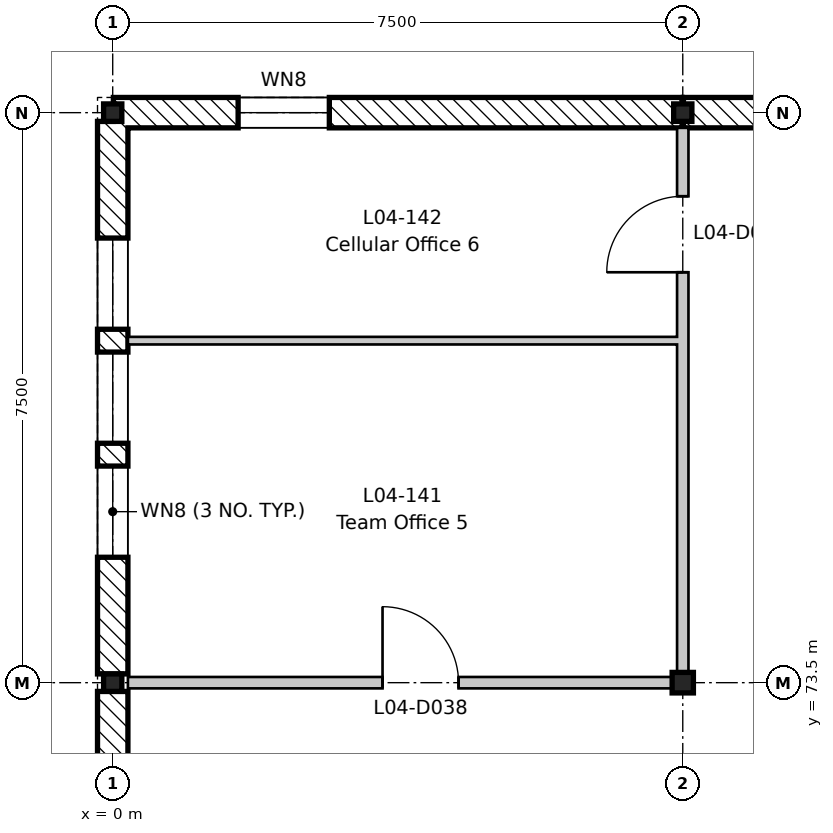
"""IFC4 building model, lengths in metres.
Left out: names, types, materials, properties, quantities, classifications, styles, units other than length and angle.
Written with IfcOpenShell. Run it as: python <this file> out.ifc"""

import sys

from ifc_helpers import new_model, si_unit, direction, frame, frame_2d, origin, origin_2d, place, context, subcontext, project, spatial, rectangle, i_section, extrude, element, fill, save


model = new_model("IFC4")
c1 = context("Model", 3, precision=1e-05, world=origin(), true_north=direction((0.0, 1.0)))
c2 = subcontext(c1, "Body", "Model", "MODEL_VIEW")
j1 = project(units=[si_unit("LENGTHUNIT", "METRE"), si_unit("PLANEANGLEUNIT", "RADIAN")], contexts=[c1])
p1 = place(None, origin())
s1 = spatial("IfcSite", under=j1, at=p1, CompositionType="ELEMENT")
p2 = place(p1, origin())
s2 = spatial("IfcBuilding", under=s1, at=p2, CompositionType="ELEMENT")
p3 = place(p2, frame((0.0, 0.0, 18.6)))
s3 = spatial("IfcBuildingStorey", under=s2, at=p3, CompositionType="ELEMENT", Elevation=18.6)
for number, where, z_axis, x_axis in (
    (1, (0.0, 73.5, -0.2), (0.0, 0.0, 1.0), (1.0, 0.0, 0.0)),
    (2, (0.0, 81.0, -0.2), (0.0, 0.0, 1.0), (1.0, 0.0, 0.0)),
):
    element("IfcColumn", number, at=place(p3, frame(where, z_axis=z_axis, x_axis=x_axis)), inside=s3, PredefinedType="COLUMN", context=c2, shape_type="SweptSolid", body=[
        extrude(i_section(OverallWidth=0.24, OverallDepth=0.23, WebThickness=0.008, FlangeThickness=0.012, FilletRadius=0.021, at=origin_2d()), origin(), (0.0, 0.0, 1.0), 4.2),
    ])
p4 = place(p3, frame((7.5, 73.5, -0.2), z_axis=(0.0, 0.0, 1.0), x_axis=(1.0, 0.0, 0.0)))
e3 = element("IfcColumn", 3, at=p4, inside=s3, PredefinedType="COLUMN", context=c2, shape_type="SweptSolid", body=[
    extrude(i_section(OverallWidth=0.28, OverallDepth=0.27, WebThickness=0.008, FlangeThickness=0.013, FilletRadius=0.024, at=origin_2d()), origin(), (0.0, 0.0, 1.0), 4.2),
])
p5 = place(p3, frame((7.5, 81.0, -0.2), z_axis=(0.0, 0.0, 1.0), x_axis=(1.0, 0.0, 0.0)))
e4 = element("IfcColumn", 4, at=p5, inside=s3, PredefinedType="COLUMN", context=c2, shape_type="SweptSolid", body=[
    extrude(i_section(OverallWidth=0.24, OverallDepth=0.23, WebThickness=0.008, FlangeThickness=0.012, FilletRadius=0.021, at=origin_2d()), origin(), (0.0, 0.0, 1.0), 4.2),
])
p6 = place(p3, frame((0.0, 70.615, 0.0), z_axis=(0.0, 0.0, 1.0), x_axis=(0.0, 1.0, 0.0)))
e5 = element("IfcWall", 5, at=p6, inside=s3, PredefinedType="STANDARD", context=c2, shape_type="SweptSolid", body=[
    extrude(rectangle(XDim=2.77, YDim=0.4, at=frame_2d((1.385, 0.0))), origin(), (0.0, 0.0, 1.0), 3.73),
])
p7 = place(p3, frame((0.0, 73.615, 0.0), z_axis=(0.0, 0.0, 1.0), x_axis=(0.0, 1.0, 0.0)))
e6 = element("IfcWall", 6, at=p7, inside=s3, PredefinedType="STANDARD", context=c2, shape_type="SweptSolid", body=[
    extrude(rectangle(XDim=7.27, YDim=0.4, at=frame_2d((3.635, 0.0))), origin(), (0.0, 0.0, 1.0), 3.6),
])
p8 = place(p7, frame((1.535, 0.0, 0.6)))
e7 = element("IfcOpeningElement", 7, at=p8, cuts=e6, PredefinedType="OPENING", context=c2, shape_type="SweptSolid", body=[
    extrude(rectangle(XDim=1.2, YDim=2.7, at=frame_2d((0.6, 1.35))), frame((0.0, 0.21, 0.0), z_axis=(0.0, -1.0, 0.0), x_axis=(1.0, 0.0, 0.0)), (0.0, 0.0, 1.0), 0.42),
])
p9 = place(p7, frame((3.035, 0.0, 0.6)))
e8 = element("IfcOpeningElement", 8, at=p9, cuts=e6, PredefinedType="OPENING", context=c2, shape_type="SweptSolid", body=[
    extrude(rectangle(XDim=1.2, YDim=2.7, at=frame_2d((0.6, 1.35))), frame((0.0, 0.21, 0.0), z_axis=(0.0, -1.0, 0.0), x_axis=(1.0, 0.0, 0.0)), (0.0, 0.0, 1.0), 0.42),
])
p10 = place(p7, frame((4.535, 0.0, 0.6)))
e9 = element("IfcOpeningElement", 9, at=p10, cuts=e6, PredefinedType="OPENING", context=c2, shape_type="SweptSolid", body=[
    extrude(rectangle(XDim=1.2, YDim=2.7, at=frame_2d((0.6, 1.35))), frame((0.0, 0.21, 0.0), z_axis=(0.0, -1.0, 0.0), x_axis=(1.0, 0.0, 0.0)), (0.0, 0.0, 1.0), 0.42),
])
p11 = place(p3, frame((0.009, 81.0, 0.0), z_axis=(0.0, 0.0, 1.0), x_axis=(1.0, 0.0, 0.0)))
e10 = element("IfcWall", 10, at=p11, inside=s3, PredefinedType="STANDARD", context=c2, shape_type="SweptSolid", body=[
    extrude(rectangle(XDim=7.482, YDim=0.4, at=frame_2d((3.741, 0.0))), origin(), (0.0, 0.0, 1.0), 3.67),
])
p12 = place(p11, frame((1.641, 0.0, 0.6)))
e11 = element("IfcOpeningElement", 11, at=p12, cuts=e10, PredefinedType="OPENING", context=c2, shape_type="SweptSolid", body=[
    extrude(rectangle(XDim=1.2, YDim=2.7, at=frame_2d((0.6, 1.35))), frame((0.0, 0.21, 0.0), z_axis=(0.0, -1.0, 0.0), x_axis=(1.0, 0.0, 0.0)), (0.0, 0.0, 1.0), 0.42),
])
p13 = place(p3, frame((7.509, 81.0, 0.0), z_axis=(0.0, 0.0, 1.0), x_axis=(1.0, 0.0, 0.0)))
e12 = element("IfcWall", 12, at=p13, inside=s3, PredefinedType="STANDARD", context=c2, shape_type="SweptSolid", body=[
    extrude(rectangle(XDim=2.982, YDim=0.4, at=frame_2d((1.491, 0.0))), origin(), (0.0, 0.0, 1.0), 3.8),
])
p14 = place(p3, frame((7.5, 73.5, 0.0), z_axis=(0.0, 0.0, 1.0), x_axis=(0.0, 1.0, 0.0)))
e13 = element("IfcWall", 13, at=p14, inside=s3, PredefinedType="PARTITIONING", context=c2, shape_type="SweptSolid", body=[
    extrude(rectangle(XDim=7.3, YDim=0.15, at=frame_2d((3.65, 0.0))), origin(), (0.0, 0.0, 1.0), 3.48),
])
p15 = place(p14, frame((5.4, 0.0, 0.0)))
e14 = element("IfcOpeningElement", 14, at=p15, cuts=e13, PredefinedType="OPENING", context=c2, shape_type="SweptSolid", body=[
    extrude(rectangle(XDim=1.0, YDim=2.1, at=frame_2d((0.5, 1.05))), frame((0.0, 0.085, 0.0), z_axis=(0.0, -1.0, 0.0), x_axis=(1.0, 0.0, 0.0)), (0.0, 0.0, 1.0), 0.17),
])
p16 = place(p3, frame((0.2, 73.5, 0.0), z_axis=(0.0, 0.0, 1.0), x_axis=(1.0, 0.0, 0.0)))
e15 = element("IfcWall", 15, at=p16, inside=s3, PredefinedType="PARTITIONING", context=c2, shape_type="SweptSolid", body=[
    extrude(rectangle(XDim=7.225, YDim=0.15, at=frame_2d((3.613, 0.0))), origin(), (0.0, 0.0, 1.0), 3.65),
])
p17 = place(p16, frame((3.35, 0.0, 0.0)))
e16 = element("IfcOpeningElement", 16, at=p17, cuts=e15, PredefinedType="OPENING", context=c2, shape_type="SweptSolid", body=[
    extrude(rectangle(XDim=1.0, YDim=2.1, at=frame_2d((0.5, 1.05))), frame((0.0, 0.085, 0.0), z_axis=(0.0, -1.0, 0.0), x_axis=(1.0, 0.0, 0.0)), (0.0, 0.0, 1.0), 0.17),
])
p18 = place(p3, frame((0.2, 78.0, 0.0), z_axis=(0.0, 0.0, 1.0), x_axis=(1.0, 0.0, 0.0)))
e17 = element("IfcWall", 17, at=p18, inside=s3, PredefinedType="PARTITIONING", context=c2, shape_type="SweptSolid", body=[
    extrude(rectangle(XDim=7.225, YDim=0.1, at=frame_2d((3.613, 0.0))), origin(), (0.0, 0.0, 1.0), 4.0),
])
p19 = place(p8, origin())
e18 = element("IfcWindow", 18, at=p19, inside=s3, PartitioningType="SINGLE_PANEL", PredefinedType="WINDOW", context=c2, shape_type="SweptSolid", body=[
    extrude(rectangle(XDim=1.2, YDim=2.7, at=frame_2d((0.6, 1.35))), frame((0.0, 0.03, 0.0), z_axis=(0.0, -1.0, 0.0), x_axis=(1.0, 0.0, 0.0)), (0.0, 0.0, 1.0), 0.06),
])
fill(e7, e18)
p20 = place(p9, origin())
e19 = element("IfcWindow", 19, at=p20, inside=s3, PartitioningType="SINGLE_PANEL", PredefinedType="WINDOW", context=c2, shape_type="SweptSolid", body=[
    extrude(rectangle(XDim=1.2, YDim=2.7, at=frame_2d((0.6, 1.35))), frame((0.0, 0.03, 0.0), z_axis=(0.0, -1.0, 0.0), x_axis=(1.0, 0.0, 0.0)), (0.0, 0.0, 1.0), 0.06),
])
fill(e8, e19)
p21 = place(p10, origin())
e20 = element("IfcWindow", 20, at=p21, inside=s3, PartitioningType="SINGLE_PANEL", PredefinedType="WINDOW", context=c2, shape_type="SweptSolid", body=[
    extrude(rectangle(XDim=1.2, YDim=2.7, at=frame_2d((0.6, 1.35))), frame((0.0, 0.03, 0.0), z_axis=(0.0, -1.0, 0.0), x_axis=(1.0, 0.0, 0.0)), (0.0, 0.0, 1.0), 0.06),
])
fill(e9, e20)
p22 = place(p12, origin())
e21 = element("IfcWindow", 21, at=p22, inside=s3, PartitioningType="SINGLE_PANEL", PredefinedType="WINDOW", context=c2, shape_type="SweptSolid", body=[
    extrude(rectangle(XDim=1.2, YDim=2.7, at=frame_2d((0.6, 1.35))), frame((0.0, 0.03, 0.0), z_axis=(0.0, -1.0, 0.0), x_axis=(1.0, 0.0, 0.0)), (0.0, 0.0, 1.0), 0.06),
])
fill(e11, e21)
p23 = place(p17, origin())
e22 = element("IfcDoor", 22, at=p23, inside=s3, OperationType="SINGLE_SWING_LEFT", PredefinedType="DOOR", context=c2, shape_type="SweptSolid", body=[
    extrude(rectangle(XDim=1.0, YDim=2.1, at=frame_2d((0.5, 1.05))), frame((0.0, 0.025, 0.0), z_axis=(0.0, -1.0, 0.0), x_axis=(1.0, 0.0, 0.0)), (0.0, 0.0, 1.0), 0.05),
])
fill(e16, e22)
p24 = place(p15, origin())
e23 = element("IfcDoor", 23, at=p24, inside=s3, OperationType="SINGLE_SWING_LEFT", PredefinedType="DOOR", context=c2, shape_type="SweptSolid", body=[
    extrude(rectangle(XDim=1.0, YDim=2.1, at=frame_2d((0.5, 1.05))), frame((0.0, 0.025, 0.0), z_axis=(0.0, -1.0, 0.0), x_axis=(1.0, 0.0, 0.0)), (0.0, 0.0, 1.0), 0.05),
])
fill(e14, e23)
save(model, sys.argv[1])
